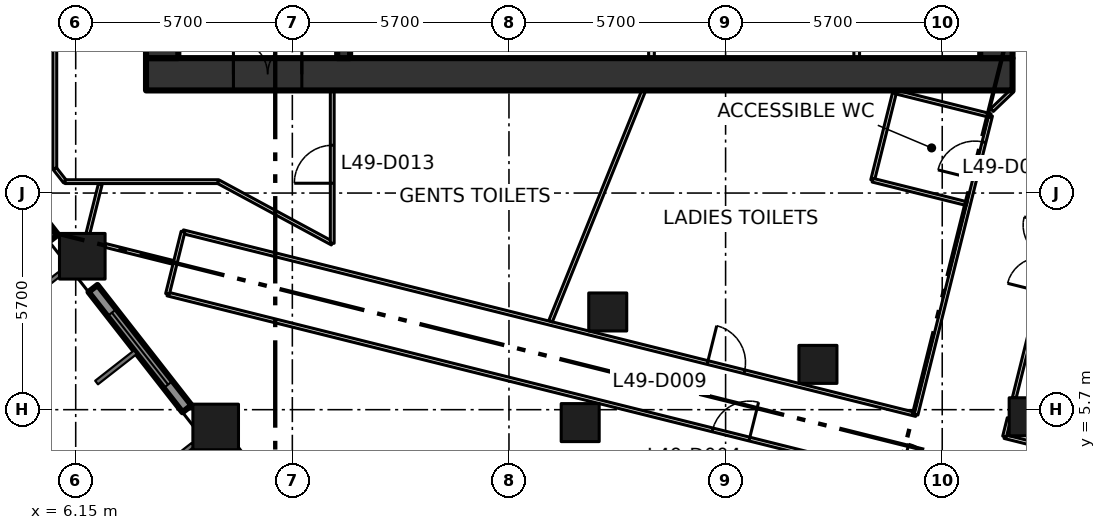
"""IFC4 building model, lengths in metres.
Left out: names, types, materials, properties, quantities, classifications, styles, units other than length and angle.
Written with IfcOpenShell. Run it as: python <this file> out.ifc"""

import sys

from ifc_helpers import new_model, si_unit, direction, frame, frame_2d, origin, origin_2d, place, context, subcontext, project, spatial, rectangle, extrude, element, fill, save


model = new_model("IFC4")
c1 = context("Model", 3, precision=1e-05, world=origin(), true_north=direction((0.0, 1.0)))
c2 = subcontext(c1, "Body", "Model", "MODEL_VIEW")
j1 = project(units=[si_unit("LENGTHUNIT", "METRE"), si_unit("PLANEANGLEUNIT", "RADIAN")], contexts=[c1])
p1 = place(None, origin())
s1 = spatial("IfcSite", under=j1, at=p1, CompositionType="ELEMENT")
p2 = place(p1, origin())
s2 = spatial("IfcBuilding", under=s1, at=p2, CompositionType="ELEMENT")
p3 = place(p2, frame((0.0, 0.0, 216.0)))
s3 = spatial("IfcBuildingStorey", under=s2, at=p3, CompositionType="ELEMENT", Elevation=216.0)
for number, where, z_axis, x_axis in (
    (1, (9.833, 5.245, 0.0), (0.0, 0.0, 1.0), (1.0, 0.0, 0.0)),
    (2, (6.323, 9.737, 0.0), (0.0, 0.0, 1.0), (1.0, 0.0, 0.0)),
):
    element("IfcColumn", number, at=place(p3, frame(where, z_axis=z_axis, x_axis=x_axis)), inside=s3, PredefinedType="COLUMN", context=c2, shape_type="SweptSolid", body=[
        extrude(rectangle(XDim=1.2, YDim=1.2, at=origin_2d()), origin(), (0.0, 0.0, 1.0), 4.2),
    ])
for number, where, z_axis, x_axis in (
    (3, (19.424, 5.36, 0.0), (0.0, 0.0, 1.0), (1.0, 0.0, 0.0)),
    (4, (20.149, 8.271, 0.0), (0.0, 0.0, 1.0), (1.0, 0.0, 0.0)),
    (5, (25.68, 6.892, 0.0), (0.0, 0.0, 1.0), (1.0, 0.0, 0.0)),
    (6, (31.211, 5.513, 0.0), (0.0, 0.0, 1.0), (1.0, 0.0, 0.0)),
):
    element("IfcColumn", number, at=place(p3, frame(where, z_axis=z_axis, x_axis=x_axis)), inside=s3, PredefinedType="COLUMN", context=c2, shape_type="SweptSolid", body=[
        extrude(rectangle(XDim=1.0, YDim=1.0, at=origin_2d()), origin(), (0.0, 0.0, 1.0), 4.2),
    ])
p4 = place(p3, frame((8.0, 14.525, -0.3), z_axis=(0.0, 0.0, 1.0), x_axis=(1.0, 0.0, 0.0)))
e7 = element("IfcWall", 7, at=p4, inside=s3, PredefinedType="SHEAR", context=c2, shape_type="SweptSolid", body=[
    extrude(rectangle(XDim=22.8, YDim=0.85, at=frame_2d((11.4, 0.0))), origin(), (0.0, 0.0, 1.0), 4.05),
])
p5 = place(p4, frame((2.3, 0.0, 0.3)))
e8 = element("IfcOpeningElement", 8, at=p5, cuts=e7, PredefinedType="OPENING", context=c2, shape_type="SweptSolid", body=[
    extrude(rectangle(XDim=1.8, YDim=2.1, at=frame_2d((0.9, 1.05))), frame((0.0, 0.435, 0.0), z_axis=(0.0, -1.0, 0.0), x_axis=(1.0, 0.0, 0.0)), (0.0, 0.0, 1.0), 0.87),
])
for number, where, z_axis, x_axis in (
    (9, (8.425, 14.95, -0.3), (0.0, 0.0, 1.0), (0.0, 1.0, 0.0)),
    (10, (30.375, 14.95, -0.3), (0.0, 0.0, 1.0), (0.0, 1.0, 0.0)),
):
    element("IfcWall", number, at=place(p3, frame(where, z_axis=z_axis, x_axis=x_axis)), inside=s3, PredefinedType="SHEAR", context=c2, shape_type="SweptSolid", body=[
        extrude(rectangle(XDim=20.75, YDim=0.85, at=frame_2d((10.375, 0.0))), origin(), (0.0, 0.0, 1.0), 4.05),
    ])
p6 = place(p3, frame((13.2, 14.95, 0.0), z_axis=(0.0, 0.0, 1.0), x_axis=(0.0, 1.0, 0.0)))
e11 = element("IfcWall", 11, at=p6, inside=s3, PredefinedType="SHEAR", context=c2, shape_type="SweptSolid", body=[
    extrude(rectangle(XDim=20.75, YDim=0.34, at=frame_2d((10.375, 0.0))), origin(), (0.0, 0.0, 1.0), 3.75),
])
p7 = place(p6, frame((3.35, 0.0, 0.0)))
e12 = element("IfcOpeningElement", 12, at=p7, cuts=e11, PredefinedType="OPENING", context=c2, shape_type="SweptSolid", body=[
    extrude(rectangle(XDim=1.8, YDim=2.1, at=frame_2d((0.9, 1.05))), frame((0.0, 0.18, 0.0), z_axis=(0.0, -1.0, 0.0), x_axis=(1.0, 0.0, 0.0)), (0.0, 0.0, 1.0), 0.36),
])
p8 = place(p6, frame((11.45, 0.0, 0.0)))
e13 = element("IfcOpeningElement", 13, at=p8, cuts=e11, PredefinedType="OPENING", context=c2, shape_type="SweptSolid", body=[
    extrude(rectangle(XDim=1.2, YDim=2.1, at=frame_2d((0.6, 1.05))), frame((0.0, 0.18, 0.0), z_axis=(0.0, -1.0, 0.0), x_axis=(1.0, 0.0, 0.0)), (0.0, 0.0, 1.0), 0.36),
])
for number, where, z_axis, x_axis in (
    (14, (21.3, 14.95, 0.0), (0.0, 0.0, 1.0), (0.0, 1.0, 0.0)),
    (15, (26.7, 14.95, 0.0), (0.0, 0.0, 1.0), (0.0, 1.0, 0.0)),
):
    element("IfcWall", number, at=place(p3, frame(where, z_axis=z_axis, x_axis=x_axis)), inside=s3, PredefinedType="PARTITIONING", context=c2, shape_type="SweptSolid", body=[
        extrude(rectangle(XDim=2.675, YDim=0.15, at=frame_2d((1.337, 0.0))), origin(), (0.0, 0.0, 1.0), 3.75),
    ])
p9 = place(p3, frame((3.096, 13.381, 0.0), z_axis=(0.0, 0.0, 1.0), x_axis=(0.615563820493, -0.78808704018, 0.0)))
e16 = element("IfcWall", 16, at=p9, inside=s3, PredefinedType="SOLIDWALL", context=c2, shape_type="SweptSolid", body=[
    extrude(rectangle(XDim=4.016, YDim=0.3, at=frame_2d((2.008, 0.0))), origin(), (0.0, 0.0, 1.0), 3.0),
])
p10 = place(p9, frame((0.808, 0.0, 0.8)))
e17 = element("IfcOpeningElement", 17, at=p10, cuts=e16, PredefinedType="OPENING", context=c2, shape_type="SweptSolid", body=[
    extrude(rectangle(XDim=2.4, YDim=1.45, at=frame_2d((1.2, 0.725))), frame((0.0, 0.16, 0.0), z_axis=(0.0, -1.0, 0.0), x_axis=(1.0, 0.0, 0.0)), (0.0, 0.0, 1.0), 0.32),
])
p11 = place(p3, frame((6.605, 8.889, 0.0), z_axis=(0.0, 0.0, 1.0), x_axis=(0.615706559089, -0.787975528233, 0.0)))
e18 = element("IfcWall", 18, at=p11, inside=s3, PredefinedType="SOLIDWALL", context=c2, shape_type="SweptSolid", body=[
    extrude(rectangle(XDim=4.016, YDim=0.3, at=frame_2d((2.008, 0.0))), origin(), (0.0, 0.0, 1.0), 3.0),
])
p12 = place(p11, frame((0.808, 0.0, 0.8)))
e19 = element("IfcOpeningElement", 19, at=p12, cuts=e18, PredefinedType="OPENING", context=c2, shape_type="SweptSolid", body=[
    extrude(rectangle(XDim=2.4, YDim=1.45, at=frame_2d((1.2, 0.725))), frame((0.0, 0.16, 0.0), z_axis=(0.0, -1.0, 0.0), x_axis=(1.0, 0.0, 0.0)), (0.0, 0.0, 1.0), 0.32),
])
p13 = place(p3, frame((10.302, 4.645, 0.0), z_axis=(0.0, 0.0, 1.0), x_axis=(0.615634966381, -0.788031463946, 0.0)))
e20 = element("IfcWall", 20, at=p13, inside=s3, PredefinedType="SOLIDWALL", context=c2, shape_type="SweptSolid", body=[
    extrude(rectangle(XDim=4.176, YDim=0.2, at=frame_2d((2.088, 0.0))), origin(), (0.0, 0.0, 1.0), 3.0),
])
p14 = place(p13, frame((1.188, 0.0, 0.0)))
e21 = element("IfcOpeningElement", 21, at=p14, cuts=e20, PredefinedType="OPENING", context=c2, shape_type="SweptSolid", body=[
    extrude(rectangle(XDim=1.8, YDim=2.9, at=frame_2d((0.9, 1.45))), frame((0.0, 0.11, 0.0), z_axis=(0.0, -1.0, 0.0), x_axis=(1.0, 0.0, 0.0)), (0.0, 0.0, 1.0), 0.22),
])
p15 = place(p3, frame((5.6, 12.043, 0.0), z_axis=(0.0, 0.0, 1.0), x_axis=(0.0, 1.0, 0.0)))
e22 = element("IfcWall", 22, at=p15, inside=s3, PredefinedType="PARTITIONING", context=c2, shape_type="SweptSolid", body=[
    extrude(rectangle(XDim=27.257, YDim=0.1, at=frame_2d((13.628, 0.0))), origin(), (0.0, 0.0, 1.0), 3.75),
])
p16 = place(p15, frame((5.78, 0.0, 0.0)))
e23 = element("IfcOpeningElement", 23, at=p16, cuts=e22, PredefinedType="OPENING", context=c2, shape_type="SweptSolid", body=[
    extrude(rectangle(XDim=1.0, YDim=2.1, at=frame_2d((0.5, 1.05))), frame((0.0, 0.06, 0.0), z_axis=(0.0, -1.0, 0.0), x_axis=(1.0, 0.0, 0.0)), (0.0, 0.0, 1.0), 0.12),
])
p17 = place(p15, frame((17.329, 0.0, 0.0)))
e24 = element("IfcOpeningElement", 24, at=p17, cuts=e22, PredefinedType="OPENING", context=c2, shape_type="SweptSolid", body=[
    extrude(rectangle(XDim=1.0, YDim=2.1, at=frame_2d((0.5, 1.05))), frame((0.0, 0.06, 0.0), z_axis=(0.0, -1.0, 0.0), x_axis=(1.0, 0.0, 0.0)), (0.0, 0.0, 1.0), 0.12),
])
p18 = place(p15, frame((24.229, 0.0, 0.0)))
e25 = element("IfcOpeningElement", 25, at=p18, cuts=e22, PredefinedType="OPENING", context=c2, shape_type="SweptSolid", body=[
    extrude(rectangle(XDim=1.8, YDim=2.1, at=frame_2d((0.9, 1.05))), frame((0.0, 0.06, 0.0), z_axis=(0.0, -1.0, 0.0), x_axis=(1.0, 0.0, 0.0)), (0.0, 0.0, 1.0), 0.12),
])
p19 = place(p3, frame((5.6, 12.043, 0.0), z_axis=(0.0, 0.0, 1.0), x_axis=(0.615415398102, -0.788202948344, 0.0)))
e26 = element("IfcWall", 26, at=p19, inside=s3, PredefinedType="PARTITIONING", context=c2, shape_type="SweptSolid", body=[
    extrude(rectangle(XDim=0.435, YDim=0.1, at=frame_2d((0.218, 0.0))), origin(), (0.0, 0.0, 1.0), 3.75),
])
p20 = place(p3, frame((5.868, 11.7, 0.0), z_axis=(0.0, 0.0, 1.0), x_axis=(1.0, 0.0, 0.0)))
e27 = element("IfcWall", 27, at=p20, inside=s3, PredefinedType="PARTITIONING", context=c2, shape_type="SweptSolid", body=[
    extrude(rectangle(XDim=4.032, YDim=0.1, at=frame_2d((2.016, 0.0))), origin(), (0.0, 0.0, 1.0), 3.75),
])
p21 = place(p3, frame((8.565, 8.744, 0.0), z_axis=(0.0, 0.0, 1.0), x_axis=(0.970296742948, -0.241917817915, 0.0)))
e28 = element("IfcWall", 28, at=p21, inside=s3, PredefinedType="PARTITIONING", context=c2, shape_type="SweptSolid", body=[
    extrude(rectangle(XDim=57.374, YDim=0.1, at=frame_2d((28.687, 0.0))), origin(), (0.0, 0.0, 1.0), 3.75),
])
p22 = place(p21, frame((48.091, 0.0, 0.0)))
e29 = element("IfcOpeningElement", 29, at=p22, cuts=e28, PredefinedType="OPENING", context=c2, shape_type="SweptSolid", body=[
    extrude(rectangle(XDim=1.8, YDim=2.1, at=frame_2d((0.9, 1.05))), frame((0.0, 0.06, 0.0), z_axis=(0.0, -1.0, 0.0), x_axis=(1.0, 0.0, 0.0)), (0.0, 0.0, 1.0), 0.12),
])
p23 = place(p21, frame((14.78, 0.0, 0.0)))
e30 = element("IfcOpeningElement", 30, at=p23, cuts=e28, PredefinedType="OPENING", context=c2, shape_type="SweptSolid", body=[
    extrude(rectangle(XDim=1.0, YDim=2.1, at=frame_2d((0.5, 1.05))), frame((0.0, 0.06, 0.0), z_axis=(0.0, -1.0, 0.0), x_axis=(1.0, 0.0, 0.0)), (0.0, 0.0, 1.0), 0.12),
])
p24 = place(p21, frame((19.88, 0.0, 0.0)))
e31 = element("IfcOpeningElement", 31, at=p24, cuts=e28, PredefinedType="OPENING", context=c2, shape_type="SweptSolid", body=[
    extrude(rectangle(XDim=1.8, YDim=2.1, at=frame_2d((0.9, 1.05))), frame((0.0, 0.06, 0.0), z_axis=(0.0, -1.0, 0.0), x_axis=(1.0, 0.0, 0.0)), (0.0, 0.0, 1.0), 0.12),
])
p25 = place(p3, frame((8.973, 10.382, 0.0), z_axis=(0.0, 0.0, 1.0), x_axis=(0.970286808807, -0.241957658808, 0.0)))
e32 = element("IfcWall", 32, at=p25, inside=s3, PredefinedType="PARTITIONING", context=c2, shape_type="SweptSolid", body=[
    extrude(rectangle(XDim=19.88, YDim=0.1, at=frame_2d((9.94, 0.0))), origin(), (0.0, 0.0, 1.0), 3.75),
])
p26 = place(p25, frame((14.225, 0.0, 0.0)))
e33 = element("IfcOpeningElement", 33, at=p26, cuts=e32, PredefinedType="OPENING", context=c2, shape_type="SweptSolid", body=[
    extrude(rectangle(XDim=1.0, YDim=2.1, at=frame_2d((0.5, 1.05))), frame((0.0, 0.06, 0.0), z_axis=(0.0, -1.0, 0.0), x_axis=(1.0, 0.0, 0.0)), (0.0, 0.0, 1.0), 0.12),
])
p27 = place(p3, frame((8.973, 10.382, 0.0), z_axis=(0.0, 0.0, 1.0), x_axis=(-0.241650823739, -0.970363271866, 0.0)))
e34 = element("IfcWall", 34, at=p27, inside=s3, PredefinedType="PARTITIONING", context=c2, shape_type="SweptSolid", body=[
    extrude(rectangle(XDim=1.688, YDim=0.1, at=frame_2d((0.844, 0.0))), origin(), (0.0, 0.0, 1.0), 3.75),
])
p28 = place(p3, frame((9.9, 11.7, 0.0), z_axis=(0.0, 0.0, 1.0), x_axis=(0.87965147249, -0.475618846291, 0.0)))
e35 = element("IfcWall", 35, at=p28, inside=s3, PredefinedType="PARTITIONING", context=c2, shape_type="SweptSolid", body=[
    extrude(rectangle(XDim=3.41, YDim=0.1, at=frame_2d((1.705, 0.0))), origin(), (0.0, 0.0, 1.0), 3.75),
])
p29 = place(p3, frame((12.9, 10.078, 0.0), z_axis=(0.0, 0.0, 1.0), x_axis=(0.0, 1.0, 0.0)))
e36 = element("IfcWall", 36, at=p29, inside=s3, PredefinedType="PARTITIONING", context=c2, shape_type="SweptSolid", body=[
    extrude(rectangle(XDim=4.022, YDim=0.1, at=frame_2d((2.011, 0.0))), origin(), (0.0, 0.0, 1.0), 3.75),
])
p30 = place(p29, frame((1.58, 0.0, 0.0)))
e37 = element("IfcOpeningElement", 37, at=p30, cuts=e36, PredefinedType="OPENING", context=c2, shape_type="SweptSolid", body=[
    extrude(rectangle(XDim=1.0, YDim=2.1, at=frame_2d((0.5, 1.05))), frame((0.0, 0.06, 0.0), z_axis=(0.0, -1.0, 0.0), x_axis=(1.0, 0.0, 0.0)), (0.0, 0.0, 1.0), 0.12),
])
p31 = place(p3, frame((28.262, 5.572, 0.0), z_axis=(0.0, 0.0, 1.0), x_axis=(0.241919014237, 0.970296444676, 0.0)))
e38 = element("IfcWall", 38, at=p31, inside=s3, PredefinedType="PARTITIONING", context=c2, shape_type="SweptSolid", body=[
    extrude(rectangle(XDim=8.106, YDim=0.1, at=frame_2d((4.053, 0.0))), origin(), (0.0, 0.0, 1.0), 3.75),
])
p32 = place(p31, frame((6.386, 0.0, 0.0)))
e39 = element("IfcOpeningElement", 39, at=p32, cuts=e38, PredefinedType="OPENING", context=c2, shape_type="SweptSolid", body=[
    extrude(rectangle(XDim=1.0, YDim=2.1, at=frame_2d((0.5, 1.05))), frame((0.0, 0.06, 0.0), z_axis=(0.0, -1.0, 0.0), x_axis=(1.0, 0.0, 0.0)), (0.0, 0.0, 1.0), 0.12),
])
p33 = place(p3, frame((30.59, 4.992, 0.0), z_axis=(0.0, 0.0, 1.0), x_axis=(0.97028916255, -0.241948219746, 0.0)))
e40 = element("IfcWall", 40, at=p33, inside=s3, PredefinedType="PARTITIONING", context=c2, shape_type="SweptSolid", body=[
    extrude(rectangle(XDim=25.526, YDim=0.1, at=frame_2d((12.763, 0.0))), origin(), (0.0, 0.0, 1.0), 3.75),
])
p34 = place(p33, frame((18.646, 0.0, 0.0)))
e41 = element("IfcOpeningElement", 41, at=p34, cuts=e40, PredefinedType="OPENING", context=c2, shape_type="SweptSolid", body=[
    extrude(rectangle(XDim=1.0, YDim=2.1, at=frame_2d((0.5, 1.05))), frame((0.0, 0.06, 0.0), z_axis=(0.0, -1.0, 0.0), x_axis=(1.0, 0.0, 0.0)), (0.0, 0.0, 1.0), 0.12),
])
p35 = place(p3, frame((30.59, 4.992, 0.0), z_axis=(0.0, 0.0, 1.0), x_axis=(0.241731207299, 0.970343250308, 0.0)))
e42 = element("IfcWall", 42, at=p35, inside=s3, PredefinedType="PARTITIONING", context=c2, shape_type="SweptSolid", body=[
    extrude(rectangle(XDim=0.5, YDim=0.1, at=frame_2d((0.25, 0.0))), origin(), (0.0, 0.0, 1.0), 3.75),
])
p36 = place(p3, frame((30.8, 14.1, 0.0), z_axis=(0.0, 0.0, 1.0), x_axis=(-0.722911025189, -0.690941133281, 0.0)))
e43 = element("IfcWall", 43, at=p36, inside=s3, PredefinedType="PARTITIONING", context=c2, shape_type="SweptSolid", body=[
    extrude(rectangle(XDim=0.748, YDim=0.1, at=frame_2d((0.374, 0.0))), origin(), (0.0, 0.0, 1.0), 3.75),
])
p37 = place(p3, frame((30.845, 6.013, 0.0), z_axis=(0.0, 0.0, 1.0), x_axis=(0.241969354343, 0.97028389225, 0.0)))
e44 = element("IfcWall", 44, at=p37, inside=s3, PredefinedType="PARTITIONING", context=c2, shape_type="SweptSolid", body=[
    extrude(rectangle(XDim=7.203, YDim=0.1, at=frame_2d((3.602, 0.0))), origin(), (0.0, 0.0, 1.0), 3.75),
])
p38 = place(p37, frame((2.88, 0.0, 0.0)))
e45 = element("IfcOpeningElement", 45, at=p38, cuts=e44, PredefinedType="OPENING", context=c2, shape_type="SweptSolid", body=[
    extrude(rectangle(XDim=1.8, YDim=2.1, at=frame_2d((0.9, 1.05))), frame((0.0, 0.06, 0.0), z_axis=(0.0, -1.0, 0.0), x_axis=(1.0, 0.0, 0.0)), (0.0, 0.0, 1.0), 0.12),
])
p39 = place(p3, frame((6.797, 11.638, 0.0), z_axis=(0.0, 0.0, 1.0), x_axis=(-0.242492789119, -0.97015320812, 0.0)))
e46 = element("IfcWall", 46, at=p39, inside=s3, PredefinedType="PARTITIONING", context=c2, shape_type="SweptSolid", body=[
    extrude(rectangle(XDim=1.341, YDim=0.1, at=frame_2d((0.67, 0.0))), origin(), (0.0, 0.0, 1.0), 3.75),
])
p40 = place(p3, frame((8.72, 9.574, 0.0), z_axis=(0.0, 0.0, 1.0), x_axis=(-0.97017350799, 0.242411559945, 0.0)))
e47 = element("IfcWall", 47, at=p40, inside=s3, PredefinedType="PARTITIONING", context=c2, shape_type="SweptSolid", body=[
    extrude(rectangle(XDim=1.852, YDim=0.1, at=frame_2d((0.926, 0.0))), origin(), (0.0, 0.0, 1.0), 3.75),
])
p41 = place(p3, frame((18.645, 8.029, 0.0), z_axis=(0.0, 0.0, 1.0), x_axis=(0.374480928684, 0.927234616509, 0.0)))
e48 = element("IfcWall", 48, at=p41, inside=s3, PredefinedType="PARTITIONING", context=c2, shape_type="SweptSolid", body=[
    extrude(rectangle(XDim=6.547, YDim=0.1, at=frame_2d((3.274, 0.0))), origin(), (0.0, 0.0, 1.0), 3.75),
])
p42 = place(p3, frame((27.119, 11.738, 0.0), z_axis=(0.0, 0.0, 1.0), x_axis=(0.242176473756, 0.970232217337, 0.0)))
e49 = element("IfcWall", 49, at=p42, inside=s3, PredefinedType="PARTITIONING", context=c2, shape_type="SweptSolid", body=[
    extrude(rectangle(XDim=2.399, YDim=0.1, at=frame_2d((1.2, 0.0))), origin(), (0.0, 0.0, 1.0), 3.75),
])
p43 = place(p3, frame((27.7, 14.066, 0.0), z_axis=(0.0, 0.0, 1.0), x_axis=(0.970307970296, -0.241872782222, 0.0)))
e50 = element("IfcWall", 50, at=p43, inside=s3, PredefinedType="PARTITIONING", context=c2, shape_type="SweptSolid", body=[
    extrude(rectangle(XDim=2.6, YDim=0.1, at=frame_2d((1.3, 0.0))), origin(), (0.0, 0.0, 1.0), 3.75),
])
p44 = place(p3, frame((29.594, 11.121, 0.0), z_axis=(0.0, 0.0, 1.0), x_axis=(-0.970311165457, 0.241859964008, 0.0)))
e51 = element("IfcWall", 51, at=p44, inside=s3, PredefinedType="PARTITIONING", context=c2, shape_type="SweptSolid", body=[
    extrude(rectangle(XDim=2.551, YDim=0.1, at=frame_2d((1.275, 0.0))), origin(), (0.0, 0.0, 1.0), 3.75),
])
p45 = place(p5, origin())
e52 = element("IfcDoor", 52, at=p45, inside=s3, OperationType="DOUBLE_DOOR_SINGLE_SWING", PredefinedType="DOOR", context=c2, shape_type="SweptSolid", body=[
    extrude(rectangle(XDim=1.8, YDim=2.1, at=frame_2d((0.9, 1.05))), frame((0.0, 0.025, 0.0), z_axis=(0.0, -1.0, 0.0), x_axis=(1.0, 0.0, 0.0)), (0.0, 0.0, 1.0), 0.05),
])
fill(e8, e52)
p46 = place(p12, origin())
e53 = element("IfcWindow", 53, at=p46, inside=s3, PartitioningType="DOUBLE_PANEL_VERTICAL", PredefinedType="WINDOW", context=c2, shape_type="SweptSolid", body=[
    extrude(rectangle(XDim=2.4, YDim=1.45, at=frame_2d((1.2, 0.725))), frame((0.0, 0.03, 0.0), z_axis=(0.0, -1.0, 0.0), x_axis=(1.0, 0.0, 0.0)), (0.0, 0.0, 1.0), 0.06),
])
fill(e19, e53)
p47 = place(p23, origin())
e54 = element("IfcDoor", 54, at=p47, inside=s3, OperationType="SINGLE_SWING_RIGHT", PredefinedType="DOOR", context=c2, shape_type="SweptSolid", body=[
    extrude(rectangle(XDim=1.0, YDim=2.1, at=frame_2d((0.5, 1.05))), frame((0.0, 0.025, 0.0), z_axis=(0.0, -1.0, 0.0), x_axis=(1.0, 0.0, 0.0)), (0.0, 0.0, 1.0), 0.05),
])
fill(e30, e54)
p48 = place(p26, origin())
e55 = element("IfcDoor", 55, at=p48, inside=s3, OperationType="SINGLE_SWING_LEFT", PredefinedType="DOOR", context=c2, shape_type="SweptSolid", body=[
    extrude(rectangle(XDim=1.0, YDim=2.1, at=frame_2d((0.5, 1.05))), frame((0.0, 0.025, 0.0), z_axis=(0.0, -1.0, 0.0), x_axis=(1.0, 0.0, 0.0)), (0.0, 0.0, 1.0), 0.05),
])
fill(e33, e55)
p49 = place(p30, origin())
e56 = element("IfcDoor", 56, at=p49, inside=s3, OperationType="SINGLE_SWING_LEFT", PredefinedType="DOOR", context=c2, shape_type="SweptSolid", body=[
    extrude(rectangle(XDim=1.0, YDim=2.1, at=frame_2d((0.5, 1.05))), frame((0.0, 0.025, 0.0), z_axis=(0.0, -1.0, 0.0), x_axis=(1.0, 0.0, 0.0)), (0.0, 0.0, 1.0), 0.05),
])
fill(e37, e56)
p50 = place(p32, origin())
e57 = element("IfcDoor", 57, at=p50, inside=s3, OperationType="SINGLE_SWING_LEFT", PredefinedType="DOOR", context=c2, shape_type="SweptSolid", body=[
    extrude(rectangle(XDim=1.0, YDim=2.1, at=frame_2d((0.5, 1.05))), frame((0.0, 0.025, 0.0), z_axis=(0.0, -1.0, 0.0), x_axis=(1.0, 0.0, 0.0)), (0.0, 0.0, 1.0), 0.05),
])
fill(e39, e57)
save(model, sys.argv[1])
